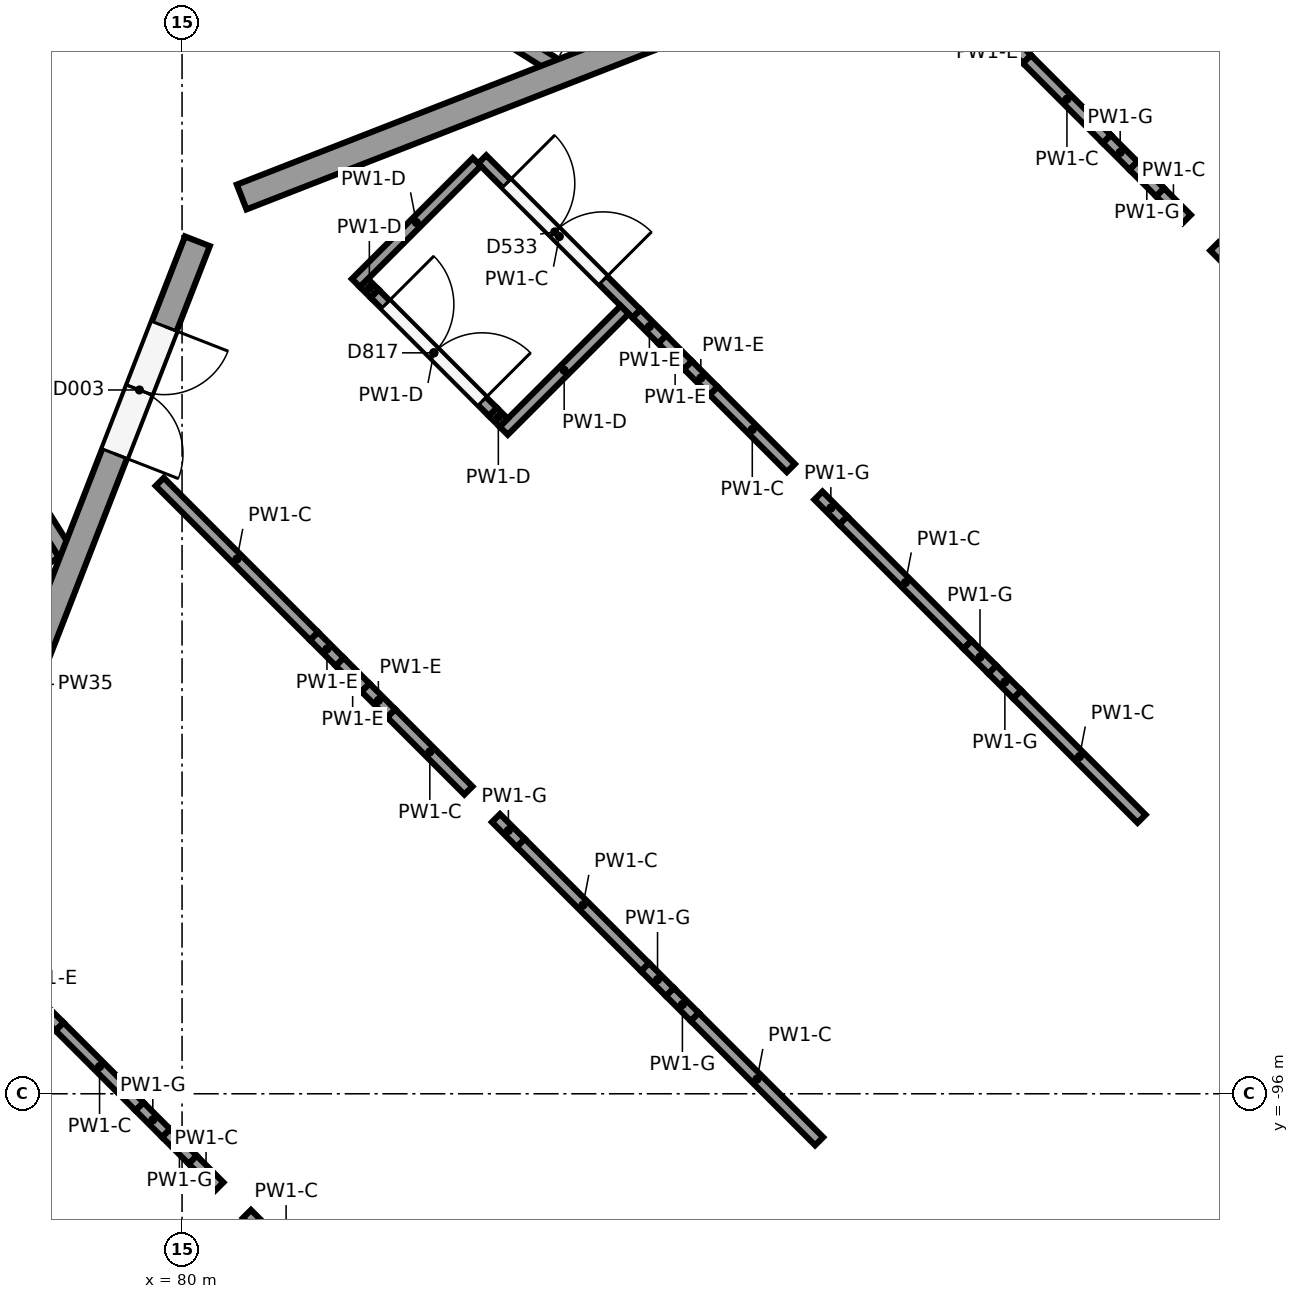
"""IFC4 building model, lengths in metres.
Left out: names, types, materials, properties, quantities, classifications, styles, units other than length and angle.
Written with IfcOpenShell. Run it as: python <this file> out.ifc"""

import sys

from ifc_helpers import new_model, si_unit, direction, frame, frame_2d, origin, origin_2d, place, context, subcontext, project, spatial, rectangle, circle, extrude, element, fill, save


model = new_model("IFC4")
c1 = context("Model", 3, precision=1e-05, world=origin(), true_north=direction((0.0, 1.0)))
c2 = subcontext(c1, "Body", "Model", "MODEL_VIEW")
j1 = project(units=[si_unit("LENGTHUNIT", "METRE"), si_unit("PLANEANGLEUNIT", "RADIAN")], contexts=[c1])
p1 = place(None, origin())
s1 = spatial("IfcSite", under=j1, at=p1, CompositionType="ELEMENT")
p2 = place(p1, origin())
s2 = spatial("IfcBuilding", under=s1, at=p2, CompositionType="ELEMENT")
p3 = place(p2, origin())
s3 = spatial("IfcBuildingStorey", under=s2, at=p3, CompositionType="ELEMENT", Elevation=0.0)
p4 = place(p3, frame((80.365, -84.365, 0.0), z_axis=(0.0, 0.0, 1.0), x_axis=(1.0, 0.0, 0.0)))
e1 = element("IfcColumn", 1, at=p4, inside=s3, PredefinedType="COLUMN", context=c2, shape_type="SweptSolid", body=[
    extrude(circle(Radius=0.45, at=origin_2d()), origin(), (0.0, 0.0, 1.0), 6.5),
])
for number, where, z_axis, x_axis in (
    (2, (84.325, -88.325, -0.3), (0.0, 0.0, 1.0), (1.0, 0.0, 0.0)),
    (3, (79.509, -97.101, -0.3), (0.0, 0.0, 1.0), (1.0, 0.0, 0.0)),
    (4, (82.907, -93.703, -0.3), (0.0, 0.0, 1.0), (1.0, 0.0, 0.0)),
    (5, (86.305, -90.305, -0.3), (0.0, 0.0, 1.0), (1.0, 0.0, 0.0)),
    (6, (89.703, -86.907, -0.3), (0.0, 0.0, 1.0), (1.0, 0.0, 0.0)),
    (7, (93.101, -83.509, -0.3), (0.0, 0.0, 1.0), (1.0, 0.0, 0.0)),
    (8, (84.849, -96.145, -0.3), (0.0, 0.0, 1.0), (1.0, 0.0, 0.0)),
    (9, (88.497, -92.497, -0.3), (0.0, 0.0, 1.0), (1.0, 0.0, 0.0)),
    (10, (92.145, -88.849, -0.3), (0.0, 0.0, 1.0), (1.0, 0.0, 0.0)),
    (11, (92.386, -96.386, -0.3), (0.0, 0.0, 1.0), (1.0, 0.0, 0.0)),
):
    element("IfcColumn", number, at=place(p3, frame(where, z_axis=z_axis, x_axis=x_axis)), inside=s3, PredefinedType="COLUMN", context=c2, shape_type="SweptSolid", body=[
        extrude(circle(Radius=0.3, at=origin_2d()), origin(), (0.0, 0.0, 1.0), 6.8),
    ])
p5 = place(p3, frame((80.202, -84.784, 0.0), z_axis=(0.0, 0.0, 1.0), x_axis=(-0.363293457312, -0.931674762927, 0.0)))
e12 = element("IfcWall", 12, at=p5, inside=s3, PredefinedType="SOLIDWALL", context=c2, shape_type="SweptSolid", body=[
    extrude(rectangle(XDim=12.514, YDim=0.35, at=frame_2d((6.257, 0.0))), origin(), (0.0, 0.0, 1.0), 4.85),
])
p6 = place(p5, frame((1.2, 0.0, 0.0)))
e13 = element("IfcOpeningElement", 13, at=p6, cuts=e12, PredefinedType="OPENING", context=c2, shape_type="SweptSolid", body=[
    extrude(rectangle(XDim=1.8, YDim=2.1, at=frame_2d((0.9, 1.05))), frame((0.0, 0.185, 0.0), z_axis=(0.0, -1.0, 0.0), x_axis=(1.0, 0.0, 0.0)), (0.0, 0.0, 1.0), 0.37),
])
p7 = place(p3, frame((92.443, -79.656, 0.0), z_axis=(0.0, 0.0, 1.0), x_axis=(-0.931674762927, -0.363293457312, 0.0)))
e14 = element("IfcWall", 14, at=p7, inside=s3, PredefinedType="SOLIDWALL", context=c2, shape_type="SweptSolid", body=[
    extrude(rectangle(XDim=12.514, YDim=0.35, at=frame_2d((6.257, 0.0))), origin(), (0.0, 0.0, 1.0), 4.85),
])
p8 = place(p3, frame((78.466, -88.888, 0.0), z_axis=(0.0, 0.0, 1.0), x_axis=(-0.532032334759, 0.846724036963, 0.0)))
e15 = element("IfcWall", 15, at=p8, inside=s3, PredefinedType="SHEAR", context=c2, shape_type="SweptSolid", body=[
    extrude(rectangle(XDim=8.8, YDim=0.2, at=frame_2d((4.4, 0.0))), origin(), (0.0, 0.0, 1.0), 6.15),
])
p9 = place(p3, frame((72.74, -92.368, 0.0), z_axis=(0.0, 0.0, 1.0), x_axis=(0.846719870989, 0.532038964807, 0.0)))
e16 = element("IfcWall", 16, at=p9, inside=s3, PredefinedType="SHEAR", context=c2, shape_type="SweptSolid", body=[
    extrude(rectangle(XDim=6.6, YDim=0.2, at=frame_2d((3.3, 0.0))), origin(), (0.0, 0.0, 1.0), 6.15),
])
p10 = place(p3, frame((84.888, -82.466, 0.0), z_axis=(0.0, 0.0, 1.0), x_axis=(-0.846722763703, 0.532034361135, 0.0)))
e17 = element("IfcWall", 17, at=p10, inside=s3, PredefinedType="SHEAR", context=c2, shape_type="SweptSolid", body=[
    extrude(rectangle(XDim=7.8, YDim=0.2, at=frame_2d((3.9, 0.0))), origin(), (0.0, 0.0, 1.0), 6.15),
])
p11 = place(p3, frame((84.856, -82.328, 0.0), z_axis=(0.0, 0.0, 1.0), x_axis=(0.532038964807, 0.846719870989, 0.0)))
e18 = element("IfcWall", 18, at=p11, inside=s3, PredefinedType="SHEAR", context=c2, shape_type="SweptSolid", body=[
    extrude(rectangle(XDim=6.6, YDim=0.2, at=frame_2d((3.3, 0.0))), origin(), (0.0, 0.0, 1.0), 6.15),
])
p12 = place(p3, frame((78.039, -94.767, 0.0), z_axis=(0.0, 0.0, 1.0), x_axis=(0.707106781187, -0.707106781187, 0.0)))
e19 = element("IfcWall", 19, at=p12, inside=s3, PredefinedType="PARTITIONING", context=c2, shape_type="SweptSolid", body=[
    extrude(rectangle(XDim=0.495, YDim=0.15, at=frame_2d((0.248, 0.0))), origin(), (0.0, 0.0, 1.0), 5.25),
])
p13 = place(p3, frame((78.389, -95.117, 0.0), z_axis=(0.0, 0.0, 1.0), x_axis=(0.707024640654, -0.707188912178, 0.0)))
e20 = element("IfcWall", 20, at=p13, inside=s3, PredefinedType="PARTITIONING", context=c2, shape_type="SweptSolid", body=[
    extrude(rectangle(XDim=1.486, YDim=0.15, at=frame_2d((0.743, 0.0))), origin(), (0.0, 0.0, 1.0), 6.05),
])
for number, where, z_axis, x_axis in (
    (21, (79.44, -96.168, 0.0), (0.0, 0.0, 1.0), (0.707, -0.707, 0.0)),
    (22, (79.79, -96.518, 0.0), (0.0, 0.0, 1.0), (0.707, -0.707, 0.0)),
):
    element("IfcWall", number, at=place(p3, frame(where, z_axis=z_axis, x_axis=x_axis)), inside=s3, PredefinedType="PARTITIONING", context=c2, shape_type="SweptSolid", body=[
        extrude(rectangle(XDim=0.495, YDim=0.15, at=frame_2d((0.248, 0.0))), origin(), (0.0, 0.0, 1.0), 5.4),
    ])
p14 = place(p3, frame((80.141, -96.868, 0.0), z_axis=(0.0, 0.0, 1.0), x_axis=(0.706860445455, -0.707353031131, 0.0)))
e23 = element("IfcWall", 23, at=p14, inside=s3, PredefinedType="PARTITIONING", context=c2, shape_type="SweptSolid", body=[
    extrude(rectangle(XDim=0.496, YDim=0.15, at=frame_2d((0.248, 0.0))), origin(), (0.0, 0.0, 1.0), 6.05),
])
p15 = place(p3, frame((80.854, -97.582, 0.0), z_axis=(0.0, 0.0, 1.0), x_axis=(0.707106781187, -0.707106781187, 0.0)))
e24 = element("IfcWall", 24, at=p15, inside=s3, PredefinedType="PARTITIONING", context=c2, shape_type="SweptSolid", body=[
    extrude(rectangle(XDim=1.458, YDim=0.15, at=frame_2d((0.729, 0.0))), origin(), (0.0, 0.0, 1.0), 6.05),
])
p16 = place(p3, frame((79.707, -87.949, 0.0), z_axis=(0.0, 0.0, 1.0), x_axis=(0.707106781187, -0.707106781187, 0.0)))
e25 = element("IfcWall", 25, at=p16, inside=s3, PredefinedType="PARTITIONING", context=c2, shape_type="SweptSolid", body=[
    extrude(rectangle(XDim=2.872, YDim=0.15, at=frame_2d((1.436, 0.0))), origin(), (0.0, 0.0, 1.0), 6.05),
])
for number, where, z_axis, x_axis in (
    (26, (81.737, -89.98, 0.0), (0.0, 0.0, 1.0), (0.707, -0.707, 0.0)),
    (27, (82.075, -90.318, 0.0), (0.0, 0.0, 1.0), (0.707, -0.707, 0.0)),
    (28, (82.414, -90.656, 0.0), (0.0, 0.0, 1.0), (0.707, -0.707, 0.0)),
):
    element("IfcWall", number, at=place(p3, frame(where, z_axis=z_axis, x_axis=x_axis)), inside=s3, PredefinedType="PARTITIONING", context=c2, shape_type="SweptSolid", body=[
        extrude(rectangle(XDim=0.479, YDim=0.15, at=frame_2d((0.239, 0.0))), origin(), (0.0, 0.0, 1.0), 5.25),
    ])
p17 = place(p3, frame((82.752, -90.995, 0.0), z_axis=(0.0, 0.0, 1.0), x_axis=(0.707106781187, -0.707106781187, 0.0)))
e29 = element("IfcWall", 29, at=p17, inside=s3, PredefinedType="PARTITIONING", context=c2, shape_type="SweptSolid", body=[
    extrude(rectangle(XDim=1.436, YDim=0.15, at=frame_2d((0.718, 0.0))), origin(), (0.0, 0.0, 1.0), 6.05),
])
p18 = place(p3, frame((84.13, -92.373, 0.0), z_axis=(0.0, 0.0, 1.0), x_axis=(0.707370676207, -0.706842787643, 0.0)))
e30 = element("IfcWall", 30, at=p18, inside=s3, PredefinedType="PARTITIONING", context=c2, shape_type="SweptSolid", body=[
    extrude(rectangle(XDim=0.462, YDim=0.15, at=frame_2d((0.231, 0.0))), origin(), (0.0, 0.0, 1.0), 5.4),
])
p19 = place(p3, frame((84.457, -92.7, 0.0), z_axis=(0.0, 0.0, 1.0), x_axis=(0.707053998237, -0.707159560196, 0.0)))
e31 = element("IfcWall", 31, at=p19, inside=s3, PredefinedType="PARTITIONING", context=c2, shape_type="SweptSolid", body=[
    extrude(rectangle(XDim=2.313, YDim=0.15, at=frame_2d((1.156, 0.0))), origin(), (0.0, 0.0, 1.0), 6.05),
])
for number, where, z_axis, x_axis in (
    (32, (86.093, -94.335, 0.0), (0.0, 0.0, 1.0), (0.707, -0.707, 0.0)),
    (33, (86.42, -94.662, 0.0), (0.0, 0.0, 1.0), (0.707, -0.707, 0.0)),
):
    element("IfcWall", number, at=place(p3, frame(where, z_axis=z_axis, x_axis=x_axis)), inside=s3, PredefinedType="PARTITIONING", context=c2, shape_type="SweptSolid", body=[
        extrude(rectangle(XDim=0.462, YDim=0.15, at=frame_2d((0.231, 0.0))), origin(), (0.0, 0.0, 1.0), 5.4),
    ])
p20 = place(p3, frame((86.747, -94.989, 0.0), z_axis=(0.0, 0.0, 1.0), x_axis=(0.707159560196, -0.707053998237, 0.0)))
e34 = element("IfcWall", 34, at=p20, inside=s3, PredefinedType="PARTITIONING", context=c2, shape_type="SweptSolid", body=[
    extrude(rectangle(XDim=2.313, YDim=0.15, at=frame_2d((1.156, 0.0))), origin(), (0.0, 0.0, 1.0), 6.05),
])
p21 = place(p3, frame((83.949, -83.707, 0.0), z_axis=(0.0, 0.0, 1.0), x_axis=(0.707106781187, -0.707106781187, 0.0)))
e35 = element("IfcWall", 35, at=p21, inside=s3, PredefinedType="PARTITIONING", context=c2, shape_type="SweptSolid", body=[
    extrude(rectangle(XDim=2.872, YDim=0.15, at=frame_2d((1.436, 0.0))), origin(), (0.0, 0.0, 1.0), 6.05),
])
p22 = place(p21, frame((0.45, 0.0, 0.0)))
e36 = element("IfcOpeningElement", 36, at=p22, cuts=e35, PredefinedType="OPENING", context=c2, shape_type="SweptSolid", body=[
    extrude(rectangle(XDim=1.8, YDim=2.1, at=frame_2d((0.9, 1.05))), frame((0.0, 0.085, 0.0), z_axis=(0.0, -1.0, 0.0), x_axis=(1.0, 0.0, 0.0)), (0.0, 0.0, 1.0), 0.17),
])
for number, where, z_axis, x_axis in (
    (37, (85.98, -85.737, 0.0), (0.0, 0.0, 1.0), (0.707, -0.707, 0.0)),
    (38, (86.318, -86.075, 0.0), (0.0, 0.0, 1.0), (0.707, -0.707, 0.0)),
    (39, (86.656, -86.414, 0.0), (0.0, 0.0, 1.0), (0.707, -0.707, 0.0)),
):
    element("IfcWall", number, at=place(p3, frame(where, z_axis=z_axis, x_axis=x_axis)), inside=s3, PredefinedType="PARTITIONING", context=c2, shape_type="SweptSolid", body=[
        extrude(rectangle(XDim=0.479, YDim=0.15, at=frame_2d((0.239, 0.0))), origin(), (0.0, 0.0, 1.0), 5.25),
    ])
p23 = place(p3, frame((86.995, -86.752, 0.0), z_axis=(0.0, 0.0, 1.0), x_axis=(0.707106781187, -0.707106781187, 0.0)))
e40 = element("IfcWall", 40, at=p23, inside=s3, PredefinedType="PARTITIONING", context=c2, shape_type="SweptSolid", body=[
    extrude(rectangle(XDim=1.436, YDim=0.15, at=frame_2d((0.718, 0.0))), origin(), (0.0, 0.0, 1.0), 6.05),
])
p24 = place(p3, frame((88.373, -88.13, 0.0), z_axis=(0.0, 0.0, 1.0), x_axis=(0.706842787643, -0.707370676207, 0.0)))
e41 = element("IfcWall", 41, at=p24, inside=s3, PredefinedType="PARTITIONING", context=c2, shape_type="SweptSolid", body=[
    extrude(rectangle(XDim=0.462, YDim=0.15, at=frame_2d((0.231, 0.0))), origin(), (0.0, 0.0, 1.0), 5.4),
])
p25 = place(p3, frame((88.7, -88.457, 0.0), z_axis=(0.0, 0.0, 1.0), x_axis=(0.707159560196, -0.707053998237, 0.0)))
e42 = element("IfcWall", 42, at=p25, inside=s3, PredefinedType="PARTITIONING", context=c2, shape_type="SweptSolid", body=[
    extrude(rectangle(XDim=2.313, YDim=0.15, at=frame_2d((1.156, 0.0))), origin(), (0.0, 0.0, 1.0), 6.05),
])
for number, where, z_axis, x_axis in (
    (43, (90.335, -90.093, 0.0), (0.0, 0.0, 1.0), (0.707, -0.707, 0.0)),
    (44, (90.662, -90.42, 0.0), (0.0, 0.0, 1.0), (0.707, -0.707, 0.0)),
):
    element("IfcWall", number, at=place(p3, frame(where, z_axis=z_axis, x_axis=x_axis)), inside=s3, PredefinedType="PARTITIONING", context=c2, shape_type="SweptSolid", body=[
        extrude(rectangle(XDim=0.462, YDim=0.15, at=frame_2d((0.231, 0.0))), origin(), (0.0, 0.0, 1.0), 5.4),
    ])
p26 = place(p3, frame((90.989, -90.747, 0.0), z_axis=(0.0, 0.0, 1.0), x_axis=(0.707053998237, -0.707159560196, 0.0)))
e45 = element("IfcWall", 45, at=p26, inside=s3, PredefinedType="PARTITIONING", context=c2, shape_type="SweptSolid", body=[
    extrude(rectangle(XDim=2.313, YDim=0.15, at=frame_2d((1.156, 0.0))), origin(), (0.0, 0.0, 1.0), 6.05),
])
p27 = place(p3, frame((90.767, -82.039, 0.0), z_axis=(0.0, 0.0, 1.0), x_axis=(0.707106781187, -0.707106781187, 0.0)))
e46 = element("IfcWall", 46, at=p27, inside=s3, PredefinedType="PARTITIONING", context=c2, shape_type="SweptSolid", body=[
    extrude(rectangle(XDim=0.495, YDim=0.15, at=frame_2d((0.248, 0.0))), origin(), (0.0, 0.0, 1.0), 5.25),
])
p28 = place(p3, frame((91.117, -82.389, 0.0), z_axis=(0.0, 0.0, 1.0), x_axis=(0.707188912178, -0.707024640654, 0.0)))
e47 = element("IfcWall", 47, at=p28, inside=s3, PredefinedType="PARTITIONING", context=c2, shape_type="SweptSolid", body=[
    extrude(rectangle(XDim=1.486, YDim=0.15, at=frame_2d((0.743, 0.0))), origin(), (0.0, 0.0, 1.0), 6.05),
])
for number, where, z_axis, x_axis in (
    (48, (92.168, -83.44, 0.0), (0.0, 0.0, 1.0), (0.707, -0.707, 0.0)),
    (49, (92.518, -83.79, 0.0), (0.0, 0.0, 1.0), (0.707, -0.707, 0.0)),
):
    element("IfcWall", number, at=place(p3, frame(where, z_axis=z_axis, x_axis=x_axis)), inside=s3, PredefinedType="PARTITIONING", context=c2, shape_type="SweptSolid", body=[
        extrude(rectangle(XDim=0.495, YDim=0.15, at=frame_2d((0.248, 0.0))), origin(), (0.0, 0.0, 1.0), 5.4),
    ])
p29 = place(p3, frame((92.868, -84.141, 0.0), z_axis=(0.0, 0.0, 1.0), x_axis=(0.707353031131, -0.706860445455, 0.0)))
e50 = element("IfcWall", 50, at=p29, inside=s3, PredefinedType="PARTITIONING", context=c2, shape_type="SweptSolid", body=[
    extrude(rectangle(XDim=0.496, YDim=0.15, at=frame_2d((0.248, 0.0))), origin(), (0.0, 0.0, 1.0), 6.05),
])
p30 = place(p3, frame((93.582, -84.854, 0.0), z_axis=(0.0, 0.0, 1.0), x_axis=(0.707106781187, -0.707106781187, 0.0)))
e51 = element("IfcWall", 51, at=p30, inside=s3, PredefinedType="PARTITIONING", context=c2, shape_type="SweptSolid", body=[
    extrude(rectangle(XDim=1.458, YDim=0.15, at=frame_2d((0.729, 0.0))), origin(), (0.0, 0.0, 1.0), 6.05),
])
p31 = place(p3, frame((79.869, -79.549, 0.0), z_axis=(0.0, 0.0, 1.0), x_axis=(-0.565957595718, -0.824434351449, 0.0)))
e52 = element("IfcWall", 52, at=p31, inside=s3, PredefinedType="PARTITIONING", context=c2, shape_type="SweptSolid", body=[
    extrude(rectangle(XDim=3.393, YDim=0.15, at=frame_2d((1.696, 0.0))), origin(), (0.0, 0.0, 1.0), 6.15),
])
for number, where, z_axis, x_axis in (
    (53, (83.879, -83.742, 0.0), (0.0, 0.0, 1.0), (-0.707, -0.707, 0.0)),
    (54, (85.823, -85.687, 0.0), (0.0, 0.0, 1.0), (-0.707, -0.707, 0.0)),
):
    element("IfcWall", number, at=place(p3, frame(where, z_axis=z_axis, x_axis=x_axis)), inside=s3, PredefinedType="PARTITIONING", context=c2, shape_type="SweptSolid", body=[
        extrude(rectangle(XDim=2.25, YDim=0.15, at=frame_2d((1.125, 0.0))), origin(), (0.0, 0.0, 1.0), 6.1),
    ])
p32 = place(p3, frame((82.394, -85.333, 0.0), z_axis=(0.0, 0.0, 1.0), x_axis=(0.707106781187, -0.707106781187, 0.0)))
e55 = element("IfcWall", 55, at=p32, inside=s3, PredefinedType="PARTITIONING", context=c2, shape_type="SweptSolid", body=[
    extrude(rectangle(XDim=0.2, YDim=0.15, at=frame_2d((0.1, 0.0))), origin(), (0.0, 0.0, 1.0), 6.1),
])
p33 = place(p3, frame((82.535, -85.474, 0.0), z_axis=(0.0, 0.0, 1.0), x_axis=(0.707106781187, -0.707106781187, 0.0)))
e56 = element("IfcWall", 56, at=p33, inside=s3, PredefinedType="PARTITIONING", context=c2, shape_type="SweptSolid", body=[
    extrude(rectangle(XDim=2.2, YDim=0.15, at=frame_2d((1.1, 0.0))), origin(), (0.0, 0.0, 1.0), 6.1),
])
p34 = place(p33, frame((0.2, 0.0, 0.0)))
e57 = element("IfcOpeningElement", 57, at=p34, cuts=e56, PredefinedType="OPENING", context=c2, shape_type="SweptSolid", body=[
    extrude(rectangle(XDim=1.8, YDim=2.1, at=frame_2d((0.9, 1.05))), frame((0.0, 0.085, 0.0), z_axis=(0.0, -1.0, 0.0), x_axis=(1.0, 0.0, 0.0)), (0.0, 0.0, 1.0), 0.17),
])
p35 = place(p3, frame((84.091, -87.03, 0.0), z_axis=(0.0, 0.0, 1.0), x_axis=(0.707716618519, -0.706496417452, 0.0)))
e58 = element("IfcWall", 58, at=p35, inside=s3, PredefinedType="PARTITIONING", context=c2, shape_type="SweptSolid", body=[
    extrude(rectangle(XDim=0.2, YDim=0.15, at=frame_2d((0.1, 0.0))), origin(), (0.0, 0.0, 1.0), 6.1),
])
p36 = place(p22, origin())
e59 = element("IfcDoor", 59, at=p36, inside=s3, OperationType="DOUBLE_DOOR_SINGLE_SWING", PredefinedType="DOOR", context=c2, shape_type="SweptSolid", body=[
    extrude(rectangle(XDim=1.8, YDim=2.1, at=frame_2d((0.9, 1.05))), frame((0.0, 0.025, 0.0), z_axis=(0.0, -1.0, 0.0), x_axis=(1.0, 0.0, 0.0)), (0.0, 0.0, 1.0), 0.05),
])
fill(e36, e59)
p37 = place(p34, origin())
e60 = element("IfcDoor", 60, at=p37, inside=s3, OperationType="DOUBLE_DOOR_SINGLE_SWING", PredefinedType="DOOR", context=c2, shape_type="SweptSolid", body=[
    extrude(rectangle(XDim=1.8, YDim=2.1, at=frame_2d((0.9, 1.05))), frame((0.0, 0.025, 0.0), z_axis=(0.0, -1.0, 0.0), x_axis=(1.0, 0.0, 0.0)), (0.0, 0.0, 1.0), 0.05),
])
fill(e57, e60)
p38 = place(p6, origin())
e61 = element("IfcDoor", 61, at=p38, inside=s3, OperationType="DOUBLE_DOOR_SINGLE_SWING", PredefinedType="DOOR", context=c2, shape_type="SweptSolid", body=[
    extrude(rectangle(XDim=1.8, YDim=2.1, at=frame_2d((0.9, 1.05))), frame((0.0, 0.025, 0.0), z_axis=(0.0, -1.0, 0.0), x_axis=(1.0, 0.0, 0.0)), (0.0, 0.0, 1.0), 0.05),
])
fill(e13, e61)
save(model, sys.argv[1])
